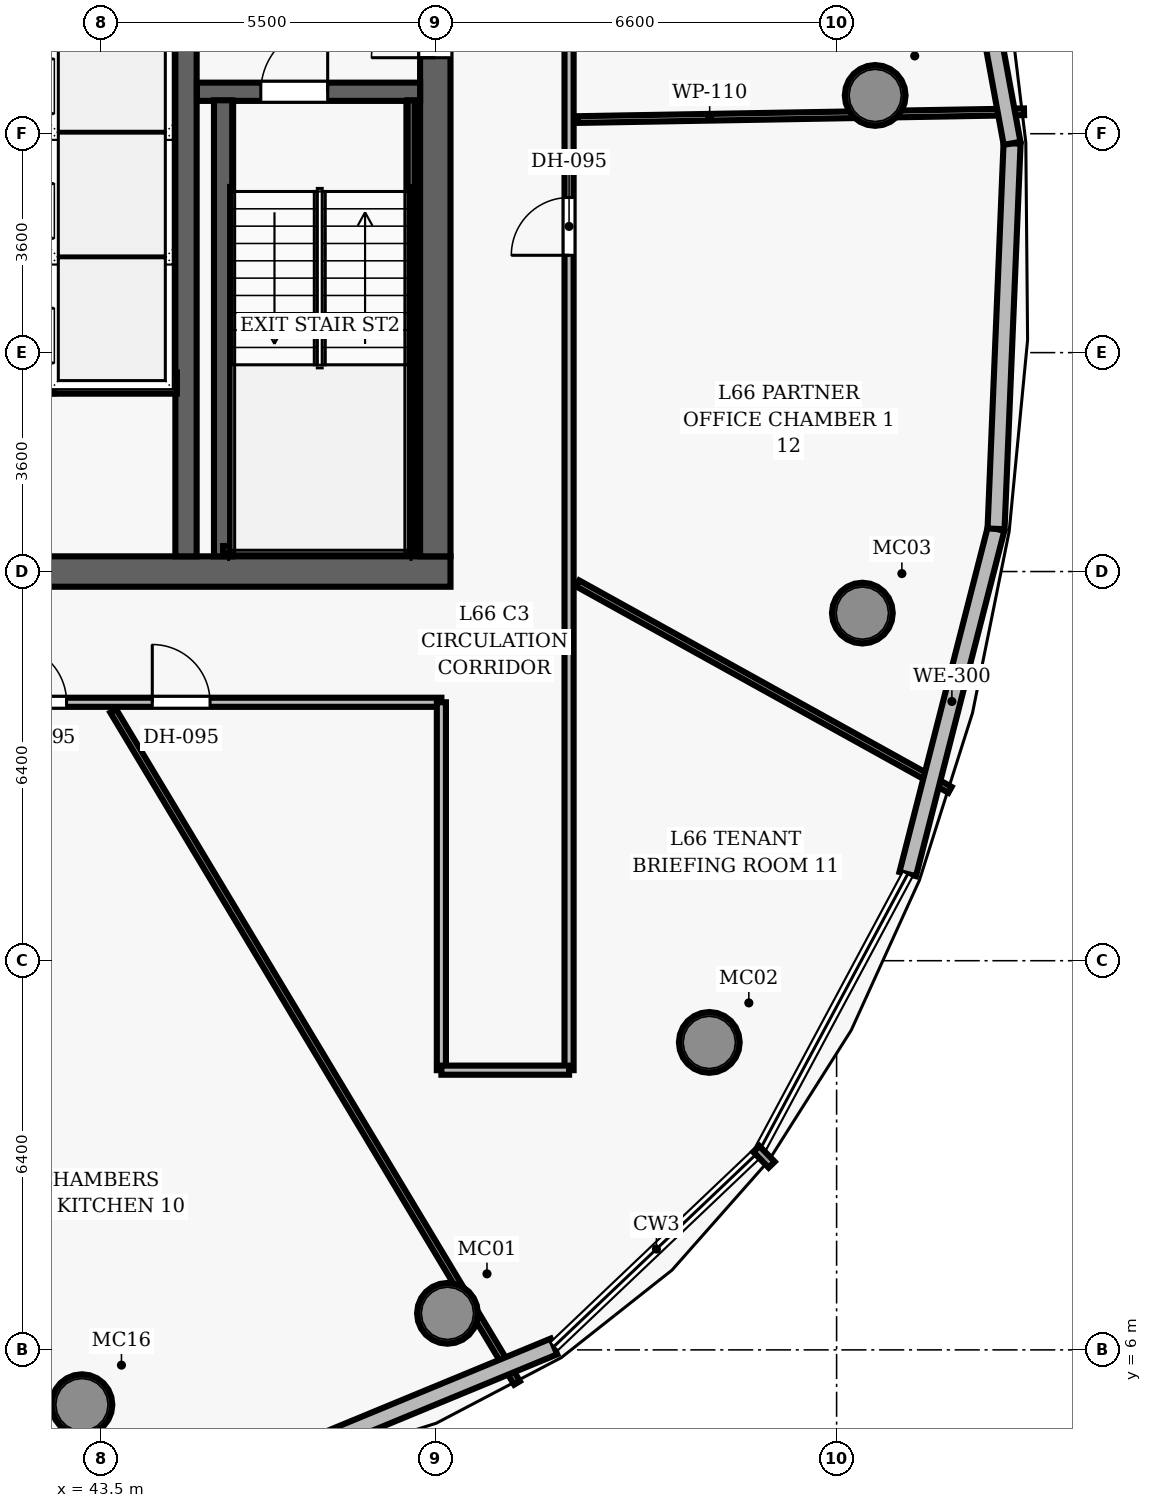
"""IFC4 building model, lengths in metres.
Left out: names, types, materials, properties, quantities, classifications, styles, units other than length and angle.
Written with IfcOpenShell. Run it as: python <this file> out.ifc"""

import sys

from ifc_helpers import new_model, si_unit, direction, frame, frame_2d, origin, origin_2d, place, context, subcontext, project, spatial, rectangle, hollow_circle, extrude, element, fill, save


model = new_model("IFC4")
c1 = context("Model", 3, precision=1e-05, world=origin(), true_north=direction((0.0, 1.0)))
c2 = subcontext(c1, "Body", "Model", "MODEL_VIEW")
j1 = project(units=[si_unit("LENGTHUNIT", "METRE"), si_unit("PLANEANGLEUNIT", "RADIAN")], contexts=[c1])
p1 = place(None, origin())
s1 = spatial("IfcSite", under=j1, at=p1, CompositionType="ELEMENT")
p2 = place(p1, origin())
s2 = spatial("IfcBuilding", under=s1, at=p2, CompositionType="ELEMENT")
p3 = place(p2, frame((0.0, 0.0, 261.3)))
s3 = spatial("IfcBuildingStorey", under=s2, at=p3, CompositionType="ELEMENT", Elevation=261.3)
p4 = place(p3, frame((26.75, 18.8, 0.0), z_axis=(0.0, 0.0, 1.0), x_axis=(1.0, 0.0, 0.0)))
e1 = element("IfcWall", 1, at=p4, inside=s3, PredefinedType="SHEAR", context=c2, shape_type="SweptSolid", body=[
    extrude(rectangle(XDim=22.5, YDim=0.5, at=frame_2d((11.25, 0.0))), origin(), (0.0, 0.0, 1.0), 3.85),
])
p5 = place(p4, frame((14.47, 0.0, 0.0)))
e2 = element("IfcOpeningElement", 2, at=p5, cuts=e1, PredefinedType="OPENING", context=c2, shape_type="SweptSolid", body=[
    extrude(rectangle(XDim=1.05, YDim=2.15, at=frame_2d((0.525, 1.075))), frame((0.0, 0.26, 0.0), z_axis=(0.0, -1.0, 0.0), x_axis=(1.0, 0.0, 0.0)), (0.0, 0.0, 1.0), 0.52),
])
p6 = place(p3, frame((49.0, 19.05, 0.0), z_axis=(0.0, 0.0, 1.0), x_axis=(0.0, 1.0, 0.0)))
e3 = element("IfcWall", 3, at=p6, inside=s3, PredefinedType="SHEAR", context=c2, shape_type="SweptSolid", body=[
    extrude(rectangle(XDim=13.9, YDim=0.5, at=frame_2d((6.95, 0.0))), origin(), (0.0, 0.0, 1.0), 3.85),
])
p7 = place(p6, frame((8.2, 0.0, 0.0)))
e4 = element("IfcOpeningElement", 4, at=p7, cuts=e3, PredefinedType="OPENING", context=c2, shape_type="SweptSolid", body=[
    extrude(rectangle(XDim=1.05, YDim=2.15, at=frame_2d((0.525, 1.075))), frame((0.0, 0.26, 0.0), z_axis=(0.0, -1.0, 0.0), x_axis=(1.0, 0.0, 0.0)), (0.0, 0.0, 1.0), 0.52),
])
p8 = place(p3, frame((44.9, 19.05, 0.0), z_axis=(0.0, 0.0, 1.0), x_axis=(0.0, 1.0, 0.0)))
e5 = element("IfcWall", 5, at=p8, inside=s3, PredefinedType="SHEAR", context=c2, shape_type="SweptSolid", body=[
    extrude(rectangle(XDim=13.9, YDim=0.35, at=frame_2d((6.95, 0.0))), origin(), (0.0, 0.0, 1.0), 3.85),
])
for number, where, z_axis, x_axis in (
    (6, (49.2, 6.601, 0.0), (0.0, 0.0, 1.0), (1.0, 0.0, 0.0)),
    (7, (53.506, 11.056, 0.0), (0.0, 0.0, 1.0), (1.0, 0.0, 0.0)),
    (8, (56.024, 18.116, 0.0), (0.0, 0.0, 1.0), (1.0, 0.0, 0.0)),
    (9, (56.235, 26.629, 0.0), (0.0, 0.0, 1.0), (1.0, 0.0, 0.0)),
    (10, (43.188, 5.099, 0.0), (0.0, 0.0, 1.0), (1.0, 0.0, 0.0)),
):
    element("IfcColumn", number, at=place(p3, frame(where, z_axis=z_axis, x_axis=x_axis)), inside=s3, PredefinedType="COLUMN", context=c2, shape_type="SweptSolid", body=[
        extrude(hollow_circle(Radius=0.5, WallThickness=0.045, at=origin_2d()), origin(), (0.0, 0.0, 1.0), 3.85),
    ])
p9 = place(p3, frame((45.08, 26.69, 0.0), z_axis=(0.0, 0.0, 1.0), x_axis=(1.0, 0.0, 0.0)))
e11 = element("IfcWall", 11, at=p9, inside=s3, PredefinedType="SHEAR", context=c2, shape_type="SweptSolid", body=[
    extrude(rectangle(XDim=3.67, YDim=0.3, at=frame_2d((1.835, 0.0))), origin(), (0.0, 0.0, 1.0), 3.85),
])
p10 = place(p9, frame((1.05, 0.0, 0.0)))
e12 = element("IfcOpeningElement", 12, at=p10, cuts=e11, PredefinedType="OPENING", context=c2, shape_type="SweptSolid", body=[
    extrude(rectangle(XDim=1.1, YDim=2.15, at=frame_2d((0.55, 1.075))), frame((0.0, 0.16, 0.0), z_axis=(0.0, -1.0, 0.0), x_axis=(1.0, 0.0, 0.0)), (0.0, 0.0, 1.0), 0.32),
])
p11 = place(p3, frame((45.51, 19.05, 0.0), z_axis=(0.0, 0.0, 1.0), x_axis=(0.0, 1.0, 0.0)))
e13 = element("IfcWall", 13, at=p11, inside=s3, PredefinedType="SHEAR", context=c2, shape_type="SweptSolid", body=[
    extrude(rectangle(XDim=7.5, YDim=0.3, at=frame_2d((3.75, 0.0))), origin(), (0.0, 0.0, 1.0), 3.85),
])
p12 = place(p3, frame((48.605, 19.1, 0.0), z_axis=(0.0, 0.0, 1.0), x_axis=(0.0, 1.0, 0.0)))
e14 = element("IfcWall", 14, at=p12, inside=s3, PredefinedType="SHEAR", context=c2, shape_type="SweptSolid", body=[
    extrude(rectangle(XDim=7.45, YDim=0.12, at=frame_2d((3.725, 0.0))), origin(), (0.0, 0.0, 1.0), 3.85),
])
p13 = place(p3, frame((45.51, 19.16, 0.0), z_axis=(0.0, 0.0, 1.0), x_axis=(1.0, 0.0, 0.0)))
e15 = element("IfcWall", 15, at=p13, inside=s3, PredefinedType="SHEAR", context=c2, shape_type="SweptSolid", body=[
    extrude(rectangle(XDim=3.095, YDim=0.12, at=frame_2d((1.547, 0.0))), origin(), (0.0, 0.0, 1.0), 3.85),
])
p14 = place(p3, frame((42.55, 21.73, 0.0), z_axis=(0.0, 0.0, 1.0), x_axis=(0.0, 1.0, 0.0)))
e16 = element("IfcWall", 16, at=p14, inside=s3, PredefinedType="SHEAR", context=c2, shape_type="SweptSolid", body=[
    extrude(rectangle(XDim=6.54, YDim=0.35, at=frame_2d((3.27, 0.0))), origin(), (0.0, 0.0, 1.0), 3.04),
])
p15 = place(p14, frame((0.5, 0.0, 0.0)))
e17 = element("IfcOpeningElement", 17, at=p15, cuts=e16, PredefinedType="OPENING", context=c2, shape_type="SweptSolid", body=[
    extrude(rectangle(XDim=0.9, YDim=2.15, at=frame_2d((0.45, 1.075))), frame((0.0, 0.185, 0.0), z_axis=(0.0, -1.0, 0.0), x_axis=(1.0, 0.0, 0.0)), (0.0, 0.0, 1.0), 0.37),
])
p16 = place(p14, frame((2.55, 0.0, 0.0)))
e18 = element("IfcOpeningElement", 18, at=p16, cuts=e16, PredefinedType="OPENING", context=c2, shape_type="SweptSolid", body=[
    extrude(rectangle(XDim=0.9, YDim=2.15, at=frame_2d((0.45, 1.075))), frame((0.0, 0.185, 0.0), z_axis=(0.0, -1.0, 0.0), x_axis=(1.0, 0.0, 0.0)), (0.0, 0.0, 1.0), 0.37),
])
p17 = place(p14, frame((4.6, 0.0, 0.0)))
e19 = element("IfcOpeningElement", 19, at=p17, cuts=e16, PredefinedType="OPENING", context=c2, shape_type="SweptSolid", body=[
    extrude(rectangle(XDim=0.9, YDim=2.15, at=frame_2d((0.45, 1.075))), frame((0.0, 0.185, 0.0), z_axis=(0.0, -1.0, 0.0), x_axis=(1.0, 0.0, 0.0)), (0.0, 0.0, 1.0), 0.37),
])
p18 = place(p3, frame((42.72, 21.9, 0.0), z_axis=(0.0, 0.0, 1.0), x_axis=(1.0, 0.0, 0.0)))
e20 = element("IfcWall", 20, at=p18, inside=s3, PredefinedType="SHEAR", context=c2, shape_type="SweptSolid", body=[
    extrude(rectangle(XDim=2.03, YDim=0.35, at=frame_2d((1.015, 0.0))), origin(), (0.0, 0.0, 1.0), 3.04),
])
p19 = place(p3, frame((26.9, 16.65, 0.0), z_axis=(0.0, 0.0, 1.0), x_axis=(1.0, 0.0, 0.0)))
e21 = element("IfcWall", 21, at=p19, inside=s3, PredefinedType="PARTITIONING", context=c2, shape_type="SweptSolid", body=[
    extrude(rectangle(XDim=22.2, YDim=0.15, at=frame_2d((11.1, 0.0))), origin(), (0.0, 0.0, 1.0), 3.04),
])
p20 = place(p19, frame((4.135, 0.0, 0.0)))
e22 = element("IfcOpeningElement", 22, at=p20, cuts=e21, PredefinedType="OPENING", context=c2, shape_type="SweptSolid", body=[
    extrude(rectangle(XDim=0.95, YDim=2.15, at=frame_2d((0.475, 1.075))), frame((0.0, 0.085, 0.0), z_axis=(0.0, -1.0, 0.0), x_axis=(1.0, 0.0, 0.0)), (0.0, 0.0, 1.0), 0.17),
])
p21 = place(p19, frame((9.584, 0.0, 0.0)))
e23 = element("IfcOpeningElement", 23, at=p21, cuts=e21, PredefinedType="OPENING", context=c2, shape_type="SweptSolid", body=[
    extrude(rectangle(XDim=0.95, YDim=2.15, at=frame_2d((0.475, 1.075))), frame((0.0, 0.085, 0.0), z_axis=(0.0, -1.0, 0.0), x_axis=(1.0, 0.0, 0.0)), (0.0, 0.0, 1.0), 0.17),
])
p22 = place(p19, frame((15.086, 0.0, 0.0)))
e24 = element("IfcOpeningElement", 24, at=p22, cuts=e21, PredefinedType="OPENING", context=c2, shape_type="SweptSolid", body=[
    extrude(rectangle(XDim=0.95, YDim=2.15, at=frame_2d((0.475, 1.075))), frame((0.0, 0.085, 0.0), z_axis=(0.0, -1.0, 0.0), x_axis=(1.0, 0.0, 0.0)), (0.0, 0.0, 1.0), 0.17),
])
p23 = place(p19, frame((17.445, 0.0, 0.0)))
e25 = element("IfcOpeningElement", 25, at=p23, cuts=e21, PredefinedType="OPENING", context=c2, shape_type="SweptSolid", body=[
    extrude(rectangle(XDim=0.95, YDim=2.15, at=frame_2d((0.475, 1.075))), frame((0.0, 0.085, 0.0), z_axis=(0.0, -1.0, 0.0), x_axis=(1.0, 0.0, 0.0)), (0.0, 0.0, 1.0), 0.17),
])
p24 = place(p3, frame((51.2, 10.6, 0.0), z_axis=(0.0, 0.0, 1.0), x_axis=(0.0, 1.0, 0.0)))
e26 = element("IfcWall", 26, at=p24, inside=s3, PredefinedType="PARTITIONING", context=c2, shape_type="SweptSolid", body=[
    extrude(rectangle(XDim=30.8, YDim=0.15, at=frame_2d((15.4, 0.0))), origin(), (0.0, 0.0, 1.0), 3.04),
])
p25 = place(p24, frame((17.79, 0.0, 0.0)))
e27 = element("IfcOpeningElement", 27, at=p25, cuts=e26, PredefinedType="OPENING", context=c2, shape_type="SweptSolid", body=[
    extrude(rectangle(XDim=0.95, YDim=2.15, at=frame_2d((0.475, 1.075))), frame((0.0, 0.085, 0.0), z_axis=(0.0, -1.0, 0.0), x_axis=(1.0, 0.0, 0.0)), (0.0, 0.0, 1.0), 0.17),
])
p26 = place(p24, frame((13.401, 0.0, 0.0)))
e28 = element("IfcOpeningElement", 28, at=p26, cuts=e26, PredefinedType="OPENING", context=c2, shape_type="SweptSolid", body=[
    extrude(rectangle(XDim=0.95, YDim=2.15, at=frame_2d((0.475, 1.075))), frame((0.0, 0.085, 0.0), z_axis=(0.0, -1.0, 0.0), x_axis=(1.0, 0.0, 0.0)), (0.0, 0.0, 1.0), 0.17),
])
p27 = place(p3, frame((49.1, 10.6, 0.0), z_axis=(0.0, 0.0, 1.0), x_axis=(0.0, 1.0, 0.0)))
e29 = element("IfcWall", 29, at=p27, inside=s3, PredefinedType="PARTITIONING", context=c2, shape_type="SweptSolid", body=[
    extrude(rectangle(XDim=6.05, YDim=0.15, at=frame_2d((3.025, 0.0))), origin(), (0.0, 0.0, 1.0), 3.04),
])
p28 = place(p3, frame((49.1, 10.6, 0.0), z_axis=(0.0, 0.0, 1.0), x_axis=(1.0, 0.0, 0.0)))
e30 = element("IfcWall", 30, at=p28, inside=s3, PredefinedType="PARTITIONING", context=c2, shape_type="SweptSolid", body=[
    extrude(rectangle(XDim=2.1, YDim=0.15, at=frame_2d((1.05, 0.0))), origin(), (0.0, 0.0, 1.0), 3.04),
])
p29 = place(p3, frame((51.34, 26.233, 0.0), z_axis=(0.0, 0.0, 1.0), x_axis=(0.999847652319, 0.017454860422, 0.0)))
e31 = element("IfcWall", 31, at=p29, inside=s3, PredefinedType="PARTITIONING", context=c2, shape_type="SweptSolid", body=[
    extrude(rectangle(XDim=7.343, YDim=0.11, at=frame_2d((3.672, 0.0))), origin(), (0.0, 0.0, 1.0), 3.04),
])
p30 = place(p3, frame((43.702, 16.51, 0.0), z_axis=(0.0, 0.0, 1.0), x_axis=(0.515038568359, -0.857167004208, 0.0)))
e32 = element("IfcWall", 32, at=p30, inside=s3, PredefinedType="PARTITIONING", context=c2, shape_type="SweptSolid", body=[
    extrude(rectangle(XDim=12.895, YDim=0.11, at=frame_2d((6.448, 0.0))), origin(), (0.0, 0.0, 1.0), 3.04),
])
p31 = place(p3, frame((51.34, 18.605, 0.0), z_axis=(0.0, 0.0, 1.0), x_axis=(0.874618985344, -0.484810922398, 0.0)))
e33 = element("IfcWall", 33, at=p31, inside=s3, PredefinedType="PARTITIONING", context=c2, shape_type="SweptSolid", body=[
    extrude(rectangle(XDim=7.003, YDim=0.11, at=frame_2d((3.501, 0.0))), origin(), (0.0, 0.0, 1.0), 3.04),
])
p32 = place(p3, frame((58.222, 19.502, 0.0), z_axis=(0.0, 0.0, 1.0), x_axis=(-0.247972381677, -0.968767102004, 0.0)))
e34 = element("IfcWall", 34, at=p32, inside=s3, PredefinedType="SOLIDWALL", context=c2, shape_type="SweptSolid", body=[
    extrude(rectangle(XDim=5.86, YDim=0.28, at=frame_2d((2.93, 0.0))), origin(), (0.0, 0.0, 1.0), 3.625),
])
p33 = place(p3, frame((58.486, 25.842, 0.0), z_axis=(0.0, 0.0, 1.0), x_axis=(-0.041516913296, -0.999137801262, 0.0)))
e35 = element("IfcWall", 35, at=p33, inside=s3, PredefinedType="SOLIDWALL", context=c2, shape_type="SweptSolid", body=[
    extrude(rectangle(XDim=6.345, YDim=0.28, at=frame_2d((3.172, 0.0))), origin(), (0.0, 0.0, 1.0), 3.625),
])
p34 = place(p3, frame((57.309, 32.261, 0.0), z_axis=(0.0, 0.0, 1.0), x_axis=(0.180386379847, -0.983595828562, 0.0)))
e36 = element("IfcWall", 36, at=p34, inside=s3, PredefinedType="SOLIDWALL", context=c2, shape_type="SweptSolid", body=[
    extrude(rectangle(XDim=6.526, YDim=0.28, at=frame_2d((3.263, 0.0))), origin(), (0.0, 0.0, 1.0), 3.625),
])
p35 = place(p3, frame((50.951, 6.056, 0.0), z_axis=(0.0, 0.0, 1.0), x_axis=(-0.924191341686, -0.381929789296, 0.0)))
e37 = element("IfcWall", 37, at=p35, inside=s3, PredefinedType="SOLIDWALL", context=c2, shape_type="SweptSolid", body=[
    extrude(rectangle(XDim=4.65, YDim=0.28, at=frame_2d((2.325, 0.0))), origin(), (0.0, 0.0, 1.0), 3.625),
])
p36 = place(p10, origin())
e38 = element("IfcDoor", 38, at=p36, inside=s3, OperationType="SINGLE_SWING_RIGHT", PredefinedType="DOOR", context=c2, shape_type="SweptSolid", body=[
    extrude(rectangle(XDim=1.1, YDim=2.15, at=frame_2d((0.55, 1.075))), frame((0.0, 0.025, 0.0), z_axis=(0.0, -1.0, 0.0), x_axis=(1.0, 0.0, 0.0)), (0.0, 0.0, 1.0), 0.05),
])
fill(e12, e38)
p37 = place(p7, origin())
e39 = element("IfcDoor", 39, at=p37, inside=s3, OperationType="SINGLE_SWING_LEFT", PredefinedType="DOOR", context=c2, shape_type="SweptSolid", body=[
    extrude(rectangle(XDim=1.05, YDim=2.15, at=frame_2d((0.525, 1.075))), frame((0.0, 0.025, 0.0), z_axis=(0.0, -1.0, 0.0), x_axis=(1.0, 0.0, 0.0)), (0.0, 0.0, 1.0), 0.05),
])
fill(e4, e39)
p38 = place(p22, origin())
e40 = element("IfcDoor", 40, at=p38, inside=s3, OperationType="SINGLE_SWING_LEFT", PredefinedType="DOOR", context=c2, shape_type="SweptSolid", body=[
    extrude(rectangle(XDim=0.95, YDim=2.15, at=frame_2d((0.475, 1.075))), frame((0.0, 0.025, 0.0), z_axis=(0.0, -1.0, 0.0), x_axis=(1.0, 0.0, 0.0)), (0.0, 0.0, 1.0), 0.05),
])
fill(e24, e40)
p39 = place(p23, origin())
e41 = element("IfcDoor", 41, at=p39, inside=s3, OperationType="SINGLE_SWING_LEFT", PredefinedType="DOOR", context=c2, shape_type="SweptSolid", body=[
    extrude(rectangle(XDim=0.95, YDim=2.15, at=frame_2d((0.475, 1.075))), frame((0.0, 0.025, 0.0), z_axis=(0.0, -1.0, 0.0), x_axis=(1.0, 0.0, 0.0)), (0.0, 0.0, 1.0), 0.05),
])
fill(e25, e41)
p40 = place(p26, origin())
e42 = element("IfcDoor", 42, at=p40, inside=s3, OperationType="SINGLE_SWING_LEFT", PredefinedType="DOOR", context=c2, shape_type="SweptSolid", body=[
    extrude(rectangle(XDim=0.95, YDim=2.15, at=frame_2d((0.475, 1.075))), frame((0.0, 0.025, 0.0), z_axis=(0.0, -1.0, 0.0), x_axis=(1.0, 0.0, 0.0)), (0.0, 0.0, 1.0), 0.05),
])
fill(e28, e42)
save(model, sys.argv[1])
